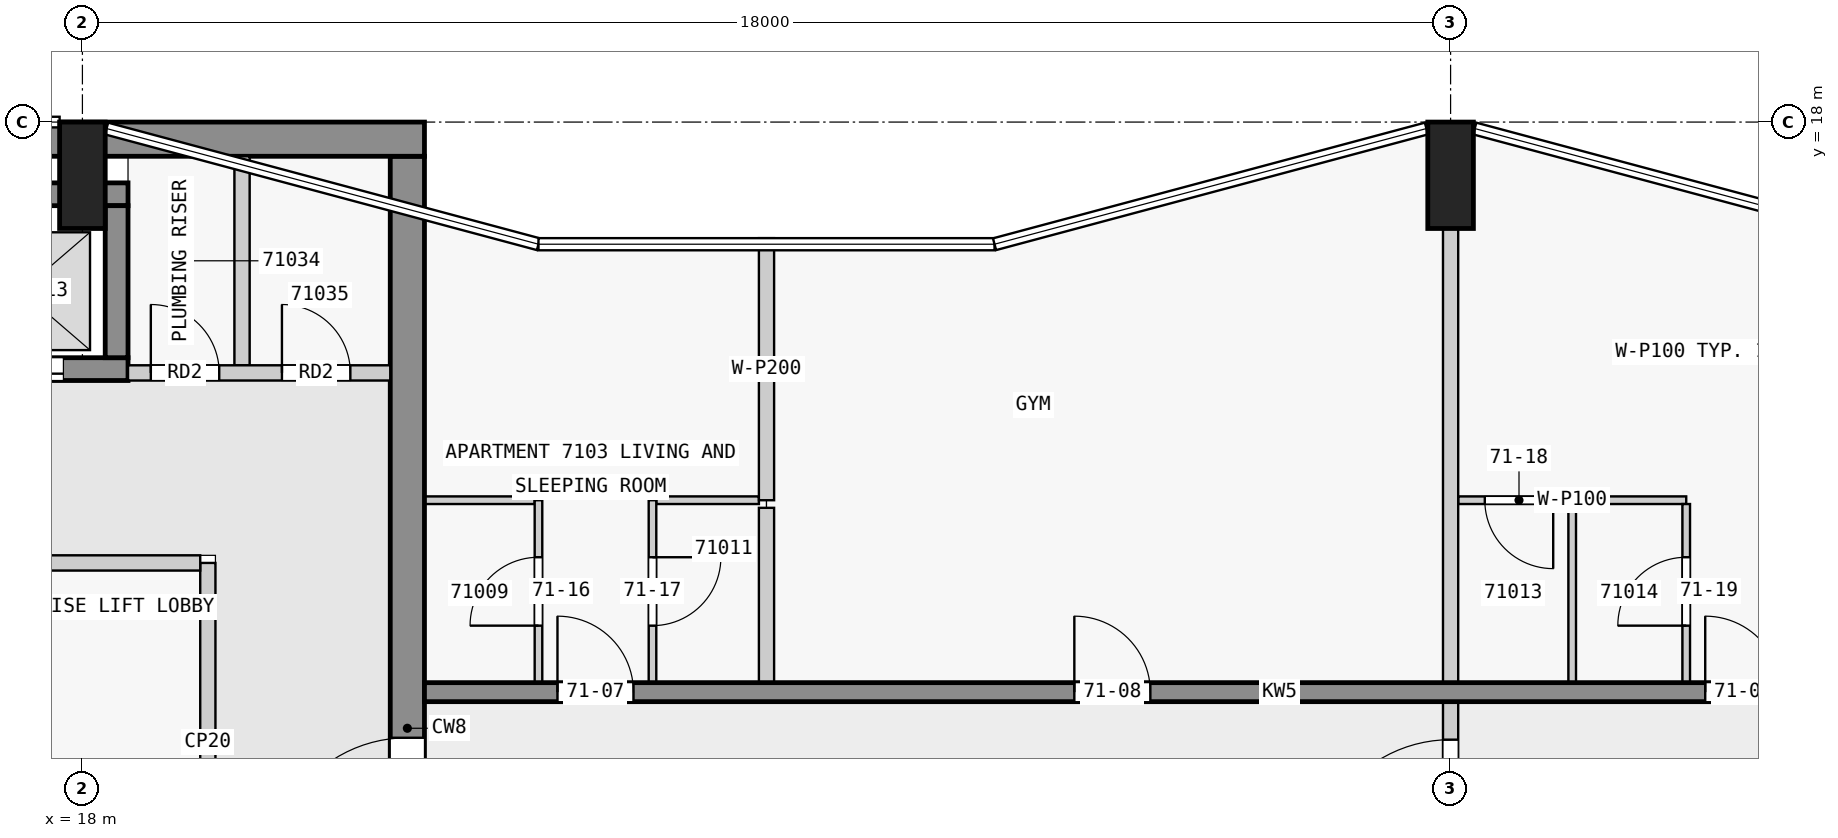
"""IFC4 building model, lengths in metres.
Left out: names, types, materials, properties, quantities, classifications, styles, units other than length and angle.
Written with IfcOpenShell. Run it as: python <this file> out.ifc"""

import sys

from ifc_helpers import new_model, si_unit, direction, frame, frame_2d, origin, origin_2d, place, context, subcontext, project, spatial, rectangle, extrude, element, fill, save


model = new_model("IFC4")
c1 = context("Model", 3, precision=1e-05, world=origin(), true_north=direction((0.0, 1.0)))
c2 = subcontext(c1, "Body", "Model", "MODEL_VIEW")
j1 = project(units=[si_unit("LENGTHUNIT", "METRE"), si_unit("PLANEANGLEUNIT", "RADIAN")], contexts=[c1])
p1 = place(None, origin())
s1 = spatial("IfcSite", under=j1, at=p1, CompositionType="ELEMENT")
p2 = place(p1, origin())
s2 = spatial("IfcBuilding", under=s1, at=p2, CompositionType="ELEMENT")
p3 = place(p2, frame((0.0, 0.0, 270.4)))
s3 = spatial("IfcBuildingStorey", under=s2, at=p3, CompositionType="ELEMENT", Elevation=270.4)
for number, where, z_axis, x_axis in (
    (1, (36.0, 17.3, 0.0), (0.0, 0.0, 1.0), (1.0, 0.0, 0.0)),
    (2, (18.0, 17.3, 0.0), (0.0, 0.0, 1.0), (1.0, 0.0, 0.0)),
):
    element("IfcColumn", number, at=place(p3, frame(where, z_axis=z_axis, x_axis=x_axis)), inside=s3, PredefinedType="COLUMN", context=c2, shape_type="SweptSolid", body=[
        extrude(rectangle(XDim=0.6, YDim=1.4, at=origin_2d()), origin(), (0.0, 0.0, 1.0), 3.5),
    ])
p4 = place(p3, frame((1.85, 17.775, 0.0), z_axis=(0.0, 0.0, 1.0), x_axis=(1.0, 0.0, 0.0)))
e3 = element("IfcWall", 3, at=p4, inside=s3, PredefinedType="SHEAR", context=c2, shape_type="SweptSolid", body=[
    extrude(rectangle(XDim=20.65, YDim=0.45, at=frame_2d((10.325, 0.0))), origin(), (0.0, 0.0, 1.0), 3.25),
])
p5 = place(p3, frame((22.275, 2.5, 0.0), z_axis=(0.0, 0.0, 1.0), x_axis=(0.0, 1.0, 0.0)))
e4 = element("IfcWall", 4, at=p5, inside=s3, PredefinedType="SHEAR", context=c2, shape_type="SweptSolid", body=[
    extrude(rectangle(XDim=15.05, YDim=0.45, at=frame_2d((7.525, 0.0))), origin(), (0.0, 0.0, 1.0), 3.25),
])
p6 = place(p5, frame((5.6, 0.0, 0.0)))
e5 = element("IfcOpeningElement", 5, at=p6, cuts=e4, PredefinedType="OPENING", context=c2, shape_type="SweptSolid", body=[
    extrude(rectangle(XDim=1.8, YDim=2.1, at=frame_2d((0.9, 1.05))), frame((0.0, 0.235, 0.0), z_axis=(0.0, -1.0, 0.0), x_axis=(1.0, 0.0, 0.0)), (0.0, 0.0, 1.0), 0.47),
])
p7 = place(p3, frame((10.8, 17.05, 0.0), z_axis=(0.0, 0.0, 1.0), x_axis=(1.0, 0.0, 0.0)))
e6 = element("IfcWall", 6, at=p7, inside=s3, PredefinedType="SHEAR", context=c2, shape_type="SweptSolid", body=[
    extrude(rectangle(XDim=7.8, YDim=0.3, at=frame_2d((3.9, 0.0))), origin(), (0.0, 0.0, 1.0), 3.25),
])
p8 = place(p3, frame((10.8, 14.75, 0.0), z_axis=(0.0, 0.0, 1.0), x_axis=(1.0, 0.0, 0.0)))
e7 = element("IfcWall", 7, at=p8, inside=s3, PredefinedType="SHEAR", context=c2, shape_type="SweptSolid", body=[
    extrude(rectangle(XDim=7.8, YDim=0.3, at=frame_2d((3.9, 0.0))), origin(), (0.0, 0.0, 1.0), 3.25),
])
p9 = place(p8, frame((0.85, 0.0, 0.0)))
e8 = element("IfcOpeningElement", 8, at=p9, cuts=e7, PredefinedType="OPENING", context=c2, shape_type="SweptSolid", body=[
    extrude(rectangle(XDim=1.1, YDim=2.1, at=frame_2d((0.55, 1.05))), frame((0.0, 0.16, 0.0), z_axis=(0.0, -1.0, 0.0), x_axis=(1.0, 0.0, 0.0)), (0.0, 0.0, 1.0), 0.32),
])
p10 = place(p8, frame((3.35, 0.0, 0.0)))
e9 = element("IfcOpeningElement", 9, at=p10, cuts=e7, PredefinedType="OPENING", context=c2, shape_type="SweptSolid", body=[
    extrude(rectangle(XDim=1.1, YDim=2.1, at=frame_2d((0.55, 1.05))), frame((0.0, 0.16, 0.0), z_axis=(0.0, -1.0, 0.0), x_axis=(1.0, 0.0, 0.0)), (0.0, 0.0, 1.0), 0.32),
])
p11 = place(p8, frame((5.85, 0.0, 0.0)))
e10 = element("IfcOpeningElement", 10, at=p11, cuts=e7, PredefinedType="OPENING", context=c2, shape_type="SweptSolid", body=[
    extrude(rectangle(XDim=1.1, YDim=2.1, at=frame_2d((0.55, 1.05))), frame((0.0, 0.16, 0.0), z_axis=(0.0, -1.0, 0.0), x_axis=(1.0, 0.0, 0.0)), (0.0, 0.0, 1.0), 0.32),
])
p12 = place(p3, frame((18.45, 14.9, 0.0), z_axis=(0.0, 0.0, 1.0), x_axis=(0.0, 1.0, 0.0)))
e11 = element("IfcWall", 11, at=p12, inside=s3, PredefinedType="SHEAR", context=c2, shape_type="SweptSolid", body=[
    extrude(rectangle(XDim=2.0, YDim=0.3, at=frame_2d((1.0, 0.0))), origin(), (0.0, 0.0, 1.0), 3.25),
])
p13 = place(p3, frame((22.5, 10.5, 0.0), z_axis=(0.0, 0.0, 1.0), x_axis=(1.0, 0.0, 0.0)))
e12 = element("IfcWall", 12, at=p13, inside=s3, PredefinedType="SHEAR", context=c2, shape_type="SweptSolid", body=[
    extrude(rectangle(XDim=22.5, YDim=0.25, at=frame_2d((11.25, 0.0))), origin(), (0.0, 0.0, 1.0), 3.25),
])
p14 = place(p13, frame((1.75, 0.0, 0.0)))
e13 = element("IfcOpeningElement", 13, at=p14, cuts=e12, PredefinedType="OPENING", context=c2, shape_type="SweptSolid", body=[
    extrude(rectangle(XDim=1.0, YDim=2.1, at=frame_2d((0.5, 1.05))), frame((0.0, 0.135, 0.0), z_axis=(0.0, -1.0, 0.0), x_axis=(1.0, 0.0, 0.0)), (0.0, 0.0, 1.0), 0.27),
])
p15 = place(p13, frame((8.55, 0.0, 0.0)))
e14 = element("IfcOpeningElement", 14, at=p15, cuts=e12, PredefinedType="OPENING", context=c2, shape_type="SweptSolid", body=[
    extrude(rectangle(XDim=1.0, YDim=2.1, at=frame_2d((0.5, 1.05))), frame((0.0, 0.135, 0.0), z_axis=(0.0, -1.0, 0.0), x_axis=(1.0, 0.0, 0.0)), (0.0, 0.0, 1.0), 0.27),
])
p16 = place(p13, frame((16.85, 0.0, 0.0)))
e15 = element("IfcOpeningElement", 15, at=p16, cuts=e12, PredefinedType="OPENING", context=c2, shape_type="SweptSolid", body=[
    extrude(rectangle(XDim=1.0, YDim=2.1, at=frame_2d((0.5, 1.05))), frame((0.0, 0.135, 0.0), z_axis=(0.0, -1.0, 0.0), x_axis=(1.0, 0.0, 0.0)), (0.0, 0.0, 1.0), 0.27),
])
p17 = place(p3, frame((19.65, 7.5, 0.0), z_axis=(0.0, 0.0, 1.0), x_axis=(0.0, 1.0, 0.0)))
e16 = element("IfcWall", 16, at=p17, inside=s3, PredefinedType="PARTITIONING", context=c2, shape_type="SweptSolid", body=[
    extrude(rectangle(XDim=4.7, YDim=0.2, at=frame_2d((2.35, 0.0))), origin(), (0.0, 0.0, 1.0), 3.25),
])
p18 = place(p3, frame((10.9, 12.2, 0.0), z_axis=(0.0, 0.0, 1.0), x_axis=(1.0, 0.0, 0.0)))
e17 = element("IfcWall", 17, at=p18, inside=s3, PredefinedType="PARTITIONING", context=c2, shape_type="SweptSolid", body=[
    extrude(rectangle(XDim=8.65, YDim=0.2, at=frame_2d((4.325, 0.0))), origin(), (0.0, 0.0, 1.0), 3.25),
])
p19 = place(p18, frame((3.875, 0.0, 0.0)))
e18 = element("IfcOpeningElement", 18, at=p19, cuts=e17, PredefinedType="OPENING", context=c2, shape_type="SweptSolid", body=[
    extrude(rectangle(XDim=0.9, YDim=2.1, at=frame_2d((0.45, 1.05))), frame((0.0, 0.11, 0.0), z_axis=(0.0, -1.0, 0.0), x_axis=(1.0, 0.0, 0.0)), (0.0, 0.0, 1.0), 0.22),
])
p20 = place(p3, frame((18.6, 14.7, 0.0), z_axis=(0.0, 0.0, 1.0), x_axis=(1.0, 0.0, 0.0)))
e19 = element("IfcWall", 19, at=p20, inside=s3, PredefinedType="PARTITIONING", context=c2, shape_type="SweptSolid", body=[
    extrude(rectangle(XDim=3.45, YDim=0.2, at=frame_2d((1.725, 0.0))), origin(), (0.0, 0.0, 1.0), 3.25),
])
p21 = place(p20, frame((0.3, 0.0, 0.0)))
e20 = element("IfcOpeningElement", 20, at=p21, cuts=e19, PredefinedType="OPENING", context=c2, shape_type="SweptSolid", body=[
    extrude(rectangle(XDim=0.9, YDim=2.1, at=frame_2d((0.45, 1.05))), frame((0.0, 0.11, 0.0), z_axis=(0.0, -1.0, 0.0), x_axis=(1.0, 0.0, 0.0)), (0.0, 0.0, 1.0), 0.22),
])
p22 = place(p20, frame((2.025, 0.0, 0.0)))
e21 = element("IfcOpeningElement", 21, at=p22, cuts=e19, PredefinedType="OPENING", context=c2, shape_type="SweptSolid", body=[
    extrude(rectangle(XDim=0.9, YDim=2.1, at=frame_2d((0.45, 1.05))), frame((0.0, 0.11, 0.0), z_axis=(0.0, -1.0, 0.0), x_axis=(1.0, 0.0, 0.0)), (0.0, 0.0, 1.0), 0.22),
])
p23 = place(p3, frame((20.1, 14.8, 0.0), z_axis=(0.0, 0.0, 1.0), x_axis=(0.0, 1.0, 0.0)))
e22 = element("IfcWall", 22, at=p23, inside=s3, PredefinedType="PARTITIONING", context=c2, shape_type="SweptSolid", body=[
    extrude(rectangle(XDim=2.75, YDim=0.2, at=frame_2d((1.375, 0.0))), origin(), (0.0, 0.0, 1.0), 3.25),
])
p24 = place(p3, frame((23.95, 13.025, 0.0), z_axis=(0.0, 0.0, 1.0), x_axis=(-1.0, 0.0, 0.0)))
e23 = element("IfcWall", 23, at=p24, inside=s3, PredefinedType="PARTITIONING", context=c2, shape_type="SweptSolid", body=[
    extrude(rectangle(XDim=1.45, YDim=0.1, at=frame_2d((0.725, 0.0))), origin(), (0.0, 0.0, 1.0), 3.25),
])
p25 = place(p3, frame((26.9, 13.025, 0.0), z_axis=(0.0, 0.0, 1.0), x_axis=(-1.0, 0.0, 0.0)))
e24 = element("IfcWall", 24, at=p25, inside=s3, PredefinedType="PARTITIONING", context=c2, shape_type="SweptSolid", body=[
    extrude(rectangle(XDim=1.35, YDim=0.1, at=frame_2d((0.675, 0.0))), origin(), (0.0, 0.0, 1.0), 3.25),
])
p26 = place(p3, frame((39.1, 13.025, 0.0), z_axis=(0.0, 0.0, 1.0), x_axis=(-1.0, 0.0, 0.0)))
e25 = element("IfcWall", 25, at=p26, inside=s3, PredefinedType="PARTITIONING", context=c2, shape_type="SweptSolid", body=[
    extrude(rectangle(XDim=3.0, YDim=0.1, at=frame_2d((1.5, 0.0))), origin(), (0.0, 0.0, 1.0), 3.25),
])
p27 = place(p26, frame((1.75, 0.0, 0.0)))
e26 = element("IfcOpeningElement", 26, at=p27, cuts=e25, PredefinedType="OPENING", context=c2, shape_type="SweptSolid", body=[
    extrude(rectangle(XDim=0.9, YDim=2.1, at=frame_2d((0.45, 1.05))), frame((0.0, 0.06, 0.0), z_axis=(0.0, -1.0, 0.0), x_axis=(1.0, 0.0, 0.0)), (0.0, 0.0, 1.0), 0.12),
])
p28 = place(p3, frame((24.0, 10.625, 0.0), z_axis=(0.0, 0.0, 1.0), x_axis=(0.0, 1.0, 0.0)))
e27 = element("IfcWall", 27, at=p28, inside=s3, PredefinedType="PARTITIONING", context=c2, shape_type="SweptSolid", body=[
    extrude(rectangle(XDim=2.4, YDim=0.1, at=frame_2d((1.2, 0.0))), origin(), (0.0, 0.0, 1.0), 3.25),
])
p29 = place(p28, frame((0.75, 0.0, 0.0)))
e28 = element("IfcOpeningElement", 28, at=p29, cuts=e27, PredefinedType="OPENING", context=c2, shape_type="SweptSolid", body=[
    extrude(rectangle(XDim=0.9, YDim=2.1, at=frame_2d((0.45, 1.05))), frame((0.0, 0.06, 0.0), z_axis=(0.0, -1.0, 0.0), x_axis=(1.0, 0.0, 0.0)), (0.0, 0.0, 1.0), 0.12),
])
p30 = place(p3, frame((25.5, 13.025, 0.0), z_axis=(0.0, 0.0, 1.0), x_axis=(0.0, -1.0, 0.0)))
e29 = element("IfcWall", 29, at=p30, inside=s3, PredefinedType="PARTITIONING", context=c2, shape_type="SweptSolid", body=[
    extrude(rectangle(XDim=2.4, YDim=0.1, at=frame_2d((1.2, 0.0))), origin(), (0.0, 0.0, 1.0), 3.25),
])
p31 = place(p30, frame((0.75, 0.0, 0.0)))
e30 = element("IfcOpeningElement", 30, at=p31, cuts=e29, PredefinedType="OPENING", context=c2, shape_type="SweptSolid", body=[
    extrude(rectangle(XDim=0.9, YDim=2.1, at=frame_2d((0.45, 1.05))), frame((0.0, 0.06, 0.0), z_axis=(0.0, -1.0, 0.0), x_axis=(1.0, 0.0, 0.0)), (0.0, 0.0, 1.0), 0.12),
])
p32 = place(p3, frame((27.0, 16.473, 0.0), z_axis=(0.0, 0.0, 1.0), x_axis=(0.0, -1.0, 0.0)))
e31 = element("IfcWall", 31, at=p32, inside=s3, PredefinedType="PARTITIONING", context=c2, shape_type="SweptSolid", body=[
    extrude(rectangle(XDim=3.448, YDim=0.2, at=frame_2d((1.724, 0.0))), origin(), (0.0, 0.0, 1.0), 3.25),
])
p33 = place(p3, frame((27.0, 10.625, 0.0), z_axis=(0.0, 0.0, 1.0), x_axis=(0.0, 1.0, 0.0)))
e32 = element("IfcWall", 32, at=p33, inside=s3, PredefinedType="PARTITIONING", context=c2, shape_type="SweptSolid", body=[
    extrude(rectangle(XDim=2.3, YDim=0.2, at=frame_2d((1.15, 0.0))), origin(), (0.0, 0.0, 1.0), 3.25),
])
p34 = place(p3, frame((36.0, 10.625, 0.0), z_axis=(0.0, 0.0, 1.0), x_axis=(0.0, 1.0, 0.0)))
e33 = element("IfcWall", 33, at=p34, inside=s3, PredefinedType="PARTITIONING", context=c2, shape_type="SweptSolid", body=[
    extrude(rectangle(XDim=5.975, YDim=0.2, at=frame_2d((2.988, 0.0))), origin(), (0.0, 0.0, 1.0), 3.25),
])
p35 = place(p3, frame((37.6, 10.625, 0.0), z_axis=(0.0, 0.0, 1.0), x_axis=(0.0, 1.0, 0.0)))
e34 = element("IfcWall", 34, at=p35, inside=s3, PredefinedType="PARTITIONING", context=c2, shape_type="SweptSolid", body=[
    extrude(rectangle(XDim=2.35, YDim=0.1, at=frame_2d((1.175, 0.0))), origin(), (0.0, 0.0, 1.0), 3.25),
])
p36 = place(p3, frame((39.1, 10.625, 0.0), z_axis=(0.0, 0.0, 1.0), x_axis=(0.0, 1.0, 0.0)))
e35 = element("IfcWall", 35, at=p36, inside=s3, PredefinedType="PARTITIONING", context=c2, shape_type="SweptSolid", body=[
    extrude(rectangle(XDim=2.35, YDim=0.1, at=frame_2d((1.175, 0.0))), origin(), (0.0, 0.0, 1.0), 3.25),
])
p37 = place(p36, frame((0.75, 0.0, 0.0)))
e36 = element("IfcOpeningElement", 36, at=p37, cuts=e35, PredefinedType="OPENING", context=c2, shape_type="SweptSolid", body=[
    extrude(rectangle(XDim=0.9, YDim=2.1, at=frame_2d((0.45, 1.05))), frame((0.0, 0.06, 0.0), z_axis=(0.0, -1.0, 0.0), x_axis=(1.0, 0.0, 0.0)), (0.0, 0.0, 1.0), 0.12),
])
p38 = place(p3, frame((36.0, 7.475, 0.0), z_axis=(0.0, 0.0, 1.0), x_axis=(0.0, 1.0, 0.0)))
e37 = element("IfcWall", 37, at=p38, inside=s3, PredefinedType="PARTITIONING", context=c2, shape_type="SweptSolid", body=[
    extrude(rectangle(XDim=3.05, YDim=0.2, at=frame_2d((1.525, 0.0))), origin(), (0.0, 0.0, 1.0), 3.25),
])
p39 = place(p38, frame((0.6, 0.0, 0.0)))
e38 = element("IfcOpeningElement", 38, at=p39, cuts=e37, PredefinedType="OPENING", context=c2, shape_type="SweptSolid", body=[
    extrude(rectangle(XDim=1.8, YDim=2.1, at=frame_2d((0.9, 1.05))), frame((0.0, 0.11, 0.0), z_axis=(0.0, -1.0, 0.0), x_axis=(1.0, 0.0, 0.0)), (0.0, 0.0, 1.0), 0.22),
])
p40 = place(p11, origin())
e39 = element("IfcDoor", 39, at=p40, inside=s3, OperationType="DOUBLE_DOOR_SLIDING", PredefinedType="DOOR", context=c2, shape_type="SweptSolid", body=[
    extrude(rectangle(XDim=1.1, YDim=2.1, at=frame_2d((0.55, 1.05))), frame((0.0, 0.025, 0.0), z_axis=(0.0, -1.0, 0.0), x_axis=(1.0, 0.0, 0.0)), (0.0, 0.0, 1.0), 0.05),
])
fill(e10, e39)
p41 = place(p6, origin())
e40 = element("IfcDoor", 40, at=p41, inside=s3, OperationType="DOUBLE_DOOR_SINGLE_SWING", PredefinedType="DOOR", context=c2, shape_type="SweptSolid", body=[
    extrude(rectangle(XDim=1.8, YDim=2.1, at=frame_2d((0.9, 1.05))), frame((0.0, 0.025, 0.0), z_axis=(0.0, -1.0, 0.0), x_axis=(1.0, 0.0, 0.0)), (0.0, 0.0, 1.0), 0.05),
])
fill(e5, e40)
p42 = place(p21, origin())
e41 = element("IfcDoor", 41, at=p42, inside=s3, OperationType="SINGLE_SWING_LEFT", PredefinedType="DOOR", context=c2, shape_type="SweptSolid", body=[
    extrude(rectangle(XDim=0.9, YDim=2.1, at=frame_2d((0.45, 1.05))), frame((0.0, 0.025, 0.0), z_axis=(0.0, -1.0, 0.0), x_axis=(1.0, 0.0, 0.0)), (0.0, 0.0, 1.0), 0.05),
])
fill(e20, e41)
p43 = place(p22, origin())
e42 = element("IfcDoor", 42, at=p43, inside=s3, OperationType="SINGLE_SWING_LEFT", PredefinedType="DOOR", context=c2, shape_type="SweptSolid", body=[
    extrude(rectangle(XDim=0.9, YDim=2.1, at=frame_2d((0.45, 1.05))), frame((0.0, 0.025, 0.0), z_axis=(0.0, -1.0, 0.0), x_axis=(1.0, 0.0, 0.0)), (0.0, 0.0, 1.0), 0.05),
])
fill(e21, e42)
p44 = place(p14, origin())
e43 = element("IfcDoor", 43, at=p44, inside=s3, OperationType="SINGLE_SWING_LEFT", PredefinedType="DOOR", context=c2, shape_type="SweptSolid", body=[
    extrude(rectangle(XDim=1.0, YDim=2.1, at=frame_2d((0.5, 1.05))), frame((0.0, 0.025, 0.0), z_axis=(0.0, -1.0, 0.0), x_axis=(1.0, 0.0, 0.0)), (0.0, 0.0, 1.0), 0.05),
])
fill(e13, e43)
p45 = place(p15, origin())
e44 = element("IfcDoor", 44, at=p45, inside=s3, OperationType="SINGLE_SWING_LEFT", PredefinedType="DOOR", context=c2, shape_type="SweptSolid", body=[
    extrude(rectangle(XDim=1.0, YDim=2.1, at=frame_2d((0.5, 1.05))), frame((0.0, 0.025, 0.0), z_axis=(0.0, -1.0, 0.0), x_axis=(1.0, 0.0, 0.0)), (0.0, 0.0, 1.0), 0.05),
])
fill(e14, e44)
p46 = place(p16, origin())
e45 = element("IfcDoor", 45, at=p46, inside=s3, OperationType="SINGLE_SWING_RIGHT", PredefinedType="DOOR", context=c2, shape_type="SweptSolid", body=[
    extrude(rectangle(XDim=1.0, YDim=2.1, at=frame_2d((0.5, 1.05))), frame((0.0, 0.025, 0.0), z_axis=(0.0, -1.0, 0.0), x_axis=(1.0, 0.0, 0.0)), (0.0, 0.0, 1.0), 0.05),
])
fill(e15, e45)
p47 = place(p39, origin())
e46 = element("IfcDoor", 46, at=p47, inside=s3, OperationType="SINGLE_SWING_LEFT", PredefinedType="DOOR", context=c2, shape_type="SweptSolid", body=[
    extrude(rectangle(XDim=1.8, YDim=2.1, at=frame_2d((0.9, 1.05))), frame((0.0, 0.025, 0.0), z_axis=(0.0, -1.0, 0.0), x_axis=(1.0, 0.0, 0.0)), (0.0, 0.0, 1.0), 0.05),
])
fill(e38, e46)
p48 = place(p29, origin())
e47 = element("IfcDoor", 47, at=p48, inside=s3, OperationType="SINGLE_SWING_LEFT", PredefinedType="DOOR", context=c2, shape_type="SweptSolid", body=[
    extrude(rectangle(XDim=0.9, YDim=2.1, at=frame_2d((0.45, 1.05))), frame((0.0, 0.025, 0.0), z_axis=(0.0, -1.0, 0.0), x_axis=(1.0, 0.0, 0.0)), (0.0, 0.0, 1.0), 0.05),
])
fill(e28, e47)
p49 = place(p31, origin())
e48 = element("IfcDoor", 48, at=p49, inside=s3, OperationType="SINGLE_SWING_LEFT", PredefinedType="DOOR", context=c2, shape_type="SweptSolid", body=[
    extrude(rectangle(XDim=0.9, YDim=2.1, at=frame_2d((0.45, 1.05))), frame((0.0, 0.025, 0.0), z_axis=(0.0, -1.0, 0.0), x_axis=(1.0, 0.0, 0.0)), (0.0, 0.0, 1.0), 0.05),
])
fill(e30, e48)
p50 = place(p27, origin())
e49 = element("IfcDoor", 49, at=p50, inside=s3, OperationType="SINGLE_SWING_RIGHT", PredefinedType="DOOR", context=c2, shape_type="SweptSolid", body=[
    extrude(rectangle(XDim=0.9, YDim=2.1, at=frame_2d((0.45, 1.05))), frame((0.0, 0.025, 0.0), z_axis=(0.0, -1.0, 0.0), x_axis=(1.0, 0.0, 0.0)), (0.0, 0.0, 1.0), 0.05),
])
fill(e26, e49)
p51 = place(p37, origin())
e50 = element("IfcDoor", 50, at=p51, inside=s3, OperationType="SINGLE_SWING_RIGHT", PredefinedType="DOOR", context=c2, shape_type="SweptSolid", body=[
    extrude(rectangle(XDim=0.9, YDim=2.1, at=frame_2d((0.45, 1.05))), frame((0.0, 0.025, 0.0), z_axis=(0.0, -1.0, 0.0), x_axis=(1.0, 0.0, 0.0)), (0.0, 0.0, 1.0), 0.05),
])
fill(e36, e50)
save(model, sys.argv[1])
